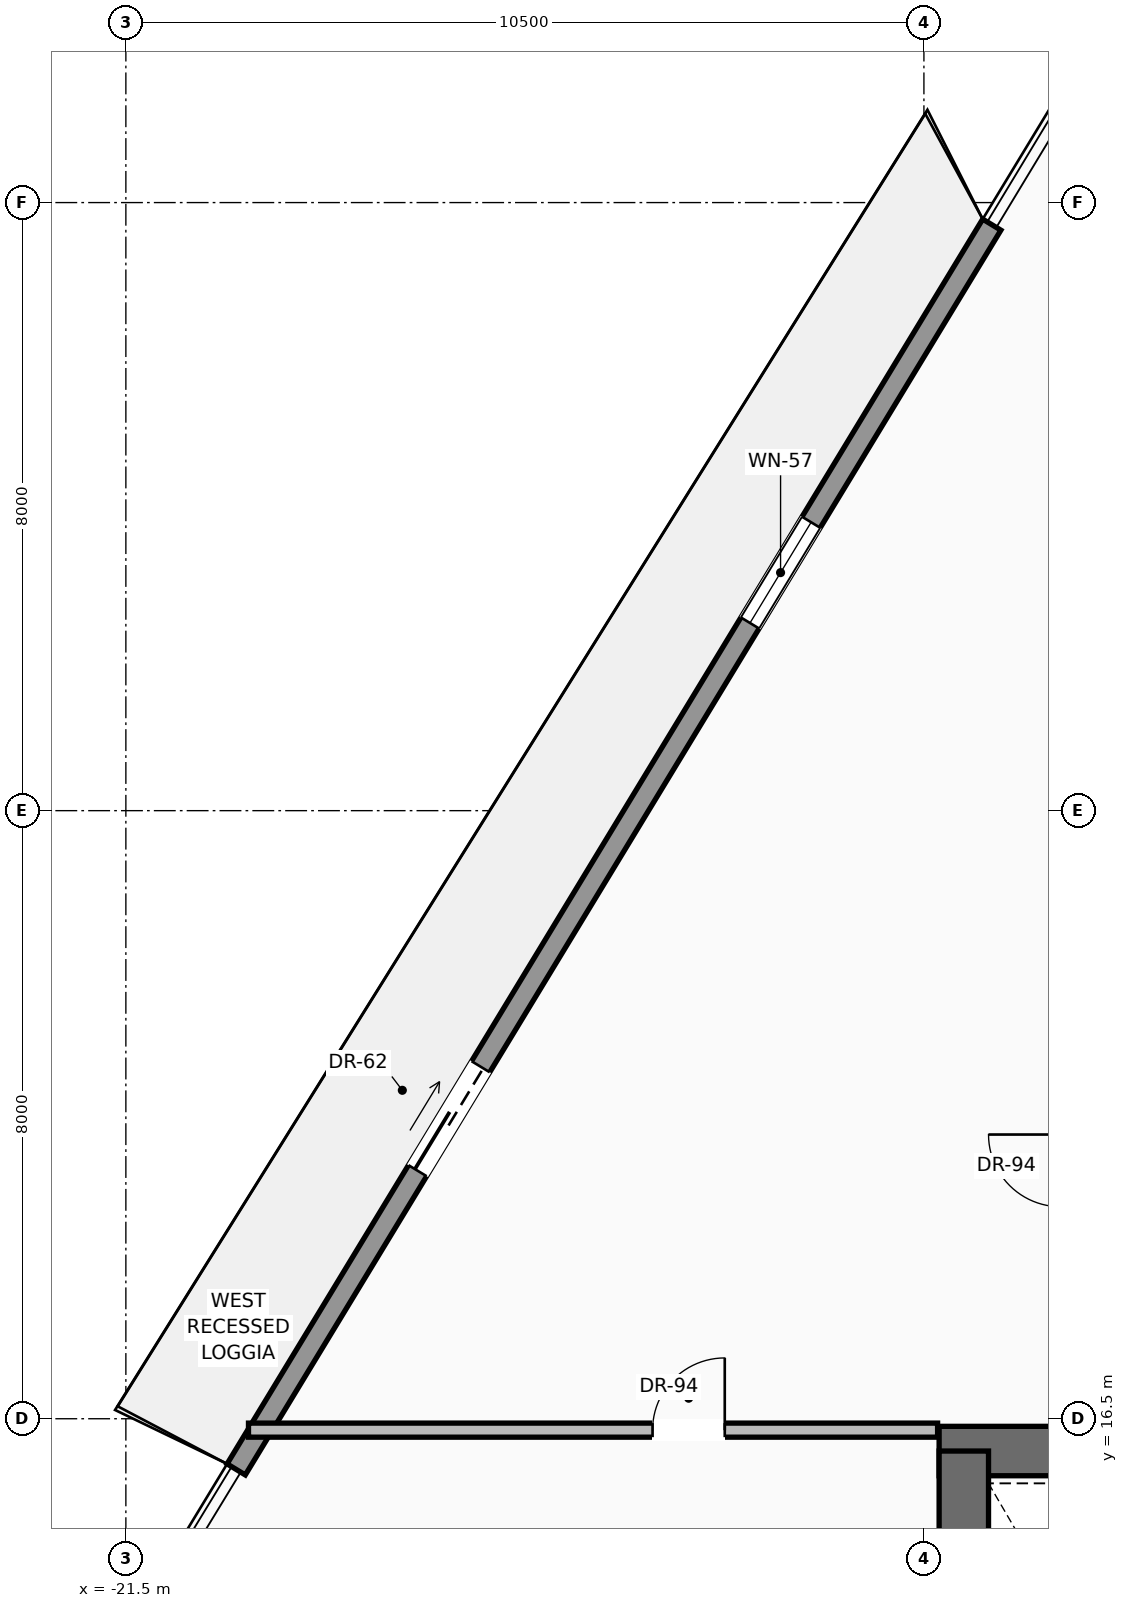
"""IFC4 building model, lengths in metres.
Left out: names, types, materials, properties, quantities, classifications, styles, units other than length and angle.
Written with IfcOpenShell. Run it as: python <this file> out.ifc"""

import sys

from ifc_helpers import new_model, si_unit, direction, frame, frame_2d, origin, place, context, subcontext, project, spatial, rectangle, extrude, source, transform, mapped, element, fill, save


model = new_model("IFC4")
c1 = context("Model", 3, precision=1e-05, world=origin(), true_north=direction((0.0, 1.0)))
c2 = subcontext(c1, "Body", "Model", "MODEL_VIEW")
j1 = project(units=[si_unit("LENGTHUNIT", "METRE"), si_unit("PLANEANGLEUNIT", "RADIAN")], contexts=[c1])
p1 = place(None, origin())
s1 = spatial("IfcSite", under=j1, at=p1, CompositionType="ELEMENT")
p2 = place(p1, origin())
s2 = spatial("IfcBuilding", under=s1, at=p2, CompositionType="ELEMENT")
p3 = place(p2, frame((0.0, 0.0, 208.0)))
s3 = spatial("IfcBuildingStorey", under=s2, at=p3, CompositionType="ELEMENT", Elevation=208.0)
p4 = place(p3, frame((-10.8, 16.075, 0.0), z_axis=(0.0, 0.0, 1.0), x_axis=(1.0, 0.0, 0.0)))
e1 = element("IfcWall", 1, at=p4, inside=s3, PredefinedType="SHEAR", context=c2, shape_type="SweptSolid", body=[
    extrude(rectangle(XDim=21.6, YDim=0.65, at=frame_2d((10.8, 0.0))), origin(), (0.0, 0.0, 1.0), 3.47),
])
p5 = place(p4, frame((3.37, 0.0, 0.0)))
e2 = element("IfcOpeningElement", 2, at=p5, cuts=e1, PredefinedType="OPENING", context=c2, shape_type="SweptSolid", body=[
    extrude(rectangle(XDim=1.3, YDim=2.3, at=frame_2d((0.65, 1.15))), frame((0.0, 0.335, 0.0), z_axis=(0.0, -1.0, 0.0), x_axis=(1.0, 0.0, 0.0)), (0.0, 0.0, 1.0), 0.67),
])
p6 = place(p4, frame((9.8, 0.0, 0.0)))
e3 = element("IfcOpeningElement", 3, at=p6, cuts=e1, PredefinedType="OPENING", context=c2, shape_type="SweptSolid", body=[
    extrude(rectangle(XDim=2.0, YDim=2.4, at=frame_2d((1.0, 1.2))), frame((0.0, 0.335, 0.0), z_axis=(0.0, -1.0, 0.0), x_axis=(1.0, 0.0, 0.0)), (0.0, 0.0, 1.0), 0.67),
])
p7 = place(p3, frame((-10.475, 0.525, 0.0), z_axis=(0.0, 0.0, 1.0), x_axis=(0.0, 1.0, 0.0)))
e4 = element("IfcWall", 4, at=p7, inside=s3, PredefinedType="SHEAR", context=c2, shape_type="SweptSolid", body=[
    extrude(rectangle(XDim=15.55, YDim=0.65, at=frame_2d((7.775, 0.0))), origin(), (0.0, 0.0, 1.0), 3.47),
])
p8 = place(p3, frame((-20.048, 15.833, 0.0), z_axis=(0.0, 0.0, 1.0), x_axis=(0.518922930311, 0.854821029455, 0.0)))
e5 = element("IfcWall", 5, at=p8, inside=s3, PredefinedType="SOLIDWALL", context=c2, shape_type="SweptSolid", body=[
    extrude(rectangle(XDim=19.158, YDim=0.28, at=frame_2d((9.579, 0.0))), origin(), (0.0, 0.0, 1.0), 3.05),
])
p9 = place(p8, frame((4.598, 0.0, 0.0)))
e6 = element("IfcOpeningElement", 6, at=p9, cuts=e5, PredefinedType="OPENING", context=c2, shape_type="SweptSolid", body=[
    extrude(rectangle(XDim=1.6, YDim=2.35, at=frame_2d((0.8, 1.175))), frame((0.0, 0.15, 0.0), z_axis=(0.0, -1.0, 0.0), x_axis=(1.0, 0.0, 0.0)), (0.0, 0.0, 1.0), 0.3),
])
p10 = place(p8, frame((13.027, 0.0, 0.9)))
e7 = element("IfcOpeningElement", 7, at=p10, cuts=e5, PredefinedType="OPENING", context=c2, shape_type="SweptSolid", body=[
    extrude(rectangle(XDim=1.55, YDim=1.85, at=frame_2d((0.775, 0.925))), frame((0.0, 0.15, 0.0), z_axis=(0.0, -1.0, 0.0), x_axis=(1.0, 0.0, 0.0)), (0.0, 0.0, 1.0), 0.3),
])
p11 = place(p3, frame((-19.887, 16.35, 0.0), z_axis=(0.0, 0.0, 1.0), x_axis=(1.0, 0.0, 0.0)))
e8 = element("IfcWall", 8, at=p11, inside=s3, PredefinedType="PARTITIONING", context=c2, shape_type="SweptSolid", body=[
    extrude(rectangle(XDim=9.067, YDim=0.185, at=frame_2d((4.533, 0.0))), origin(), (0.0, 0.0, 1.0), 3.462),
])
p12 = place(p11, frame((5.316, 0.0, 0.0)))
e9 = element("IfcOpeningElement", 9, at=p12, cuts=e8, PredefinedType="OPENING", context=c2, shape_type="SweptSolid", body=[
    extrude(rectangle(XDim=0.95, YDim=2.2, at=frame_2d((0.475, 1.1))), frame((0.0, 0.103, 0.0), z_axis=(0.0, -1.0, 0.0), x_axis=(1.0, 0.0, 0.0)), (0.0, 0.0, 1.0), 0.205),
])
m1 = source(origin(), c2, "Body", "SweptSolid", [
    extrude(rectangle(XDim=1.6, YDim=2.35, at=frame_2d((0.8, 1.175))), frame((0.0, 0.025, 0.0), z_axis=(0.0, -1.0, 0.0), x_axis=(1.0, 0.0, 0.0)), (0.0, 0.0, 1.0), 0.05),
])
p13 = place(p9, origin())
e10 = element("IfcDoor", 10, at=p13, inside=s3, OperationType="SLIDING_TO_LEFT", PredefinedType="DOOR", context=c2, shape_type="MappedRepresentation", body=[
    mapped(m1, transform((0.0, 0.0, 0.0), scale=1.0)),
])
fill(e6, e10)
m2 = source(origin(), c2, "Body", "SweptSolid", [
    extrude(rectangle(XDim=1.55, YDim=1.85, at=frame_2d((0.775, 0.925))), frame((0.0, 0.03, 0.0), z_axis=(0.0, -1.0, 0.0), x_axis=(1.0, 0.0, 0.0)), (0.0, 0.0, 1.0), 0.06),
])
p14 = place(p10, origin())
e11 = element("IfcWindow", 11, at=p14, inside=s3, PartitioningType="SINGLE_PANEL", PredefinedType="WINDOW", context=c2, shape_type="MappedRepresentation", body=[
    mapped(m2, transform((0.0, 0.0, 0.0), scale=1.0)),
])
fill(e7, e11)
m3 = source(origin(), c2, "Body", "SweptSolid", [
    extrude(rectangle(XDim=0.95, YDim=2.2, at=frame_2d((0.475, 1.1))), frame((0.0, 0.025, 0.0), z_axis=(0.0, -1.0, 0.0), x_axis=(1.0, 0.0, 0.0)), (0.0, 0.0, 1.0), 0.05),
])
p15 = place(p12, origin())
e12 = element("IfcDoor", 12, at=p15, inside=s3, OperationType="SINGLE_SWING_RIGHT", PredefinedType="DOOR", context=c2, shape_type="MappedRepresentation", body=[
    mapped(m3, transform((0.0, 0.0, 0.0), scale=1.0)),
])
fill(e9, e12)
save(model, sys.argv[1])
